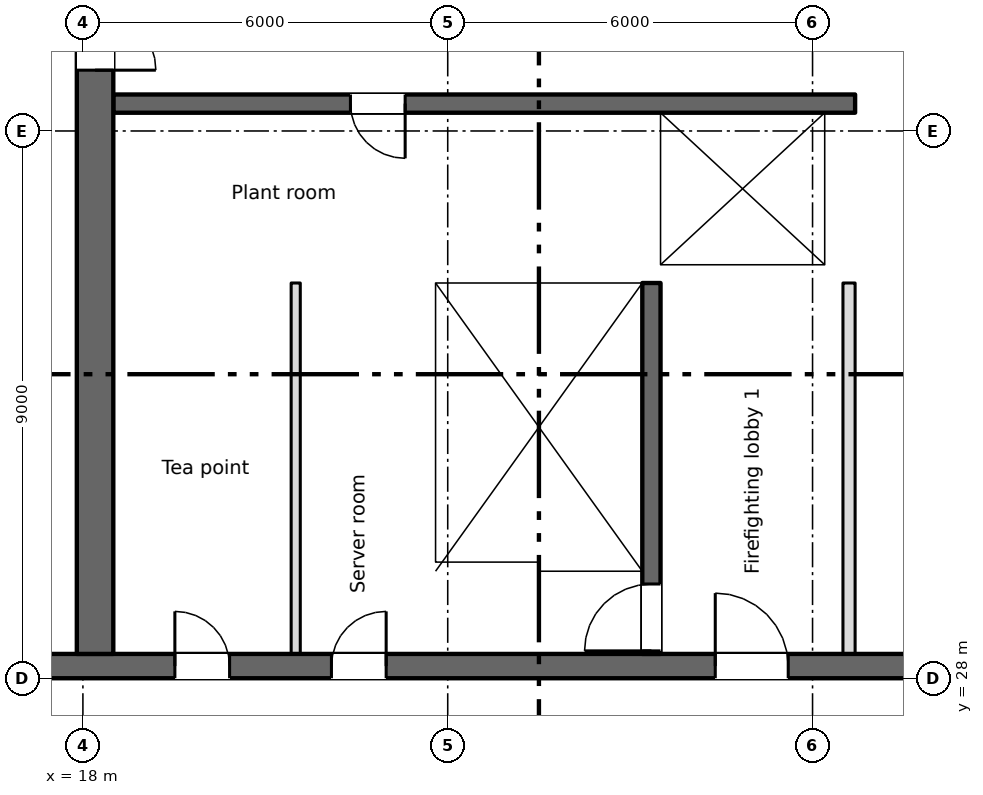
"""IFC4 building model, lengths in metres.
Left out: names, types, materials, properties, quantities, classifications, styles, units other than length and angle.
Written with IfcOpenShell. Run it as: python <this file> out.ifc"""

import sys

from ifc_helpers import new_model, si_unit, direction, frame, frame_2d, origin, place, context, subcontext, project, spatial, rectangle, extrude, element, fill, save


model = new_model("IFC4")
c1 = context("Model", 3, precision=1e-05, world=origin(), true_north=direction((0.0, 1.0)))
c2 = subcontext(c1, "Body", "Model", "MODEL_VIEW")
j1 = project(units=[si_unit("LENGTHUNIT", "METRE"), si_unit("PLANEANGLEUNIT", "RADIAN")], contexts=[c1])
p1 = place(None, origin())
s1 = spatial("IfcSite", under=j1, at=p1, CompositionType="ELEMENT")
p2 = place(p1, origin())
s2 = spatial("IfcBuilding", under=s1, at=p2, CompositionType="ELEMENT")
p3 = place(p2, frame((0.0, 0.0, 231.75)))
s3 = spatial("IfcBuildingStorey", under=s2, at=p3, CompositionType="ELEMENT", Elevation=231.75)
p4 = place(p3, frame((6.5, 28.2, 0.0), z_axis=(0.0, 0.0, 1.0), x_axis=(1.0, 0.0, 0.0)))
e1 = element("IfcWall", 1, at=p4, inside=s3, PredefinedType="SHEAR", context=c2, shape_type="SweptSolid", body=[
    extrude(rectangle(XDim=58.0, YDim=0.4, at=frame_2d((29.0, 0.0))), origin(), (0.0, 0.0, 1.0), 3.4),
])
p5 = place(p4, frame((13.012, 0.0, 0.0)))
e2 = element("IfcOpeningElement", 2, at=p5, cuts=e1, PredefinedType="OPENING", context=c2, shape_type="SweptSolid", body=[
    extrude(rectangle(XDim=0.9, YDim=2.1, at=frame_2d((0.45, 1.05))), frame((0.0, 0.21, 0.0), z_axis=(0.0, -1.0, 0.0), x_axis=(1.0, 0.0, 0.0)), (0.0, 0.0, 1.0), 0.42),
])
p6 = place(p4, frame((15.587, 0.0, 0.0)))
e3 = element("IfcOpeningElement", 3, at=p6, cuts=e1, PredefinedType="OPENING", context=c2, shape_type="SweptSolid", body=[
    extrude(rectangle(XDim=0.9, YDim=2.1, at=frame_2d((0.45, 1.05))), frame((0.0, 0.21, 0.0), z_axis=(0.0, -1.0, 0.0), x_axis=(1.0, 0.0, 0.0)), (0.0, 0.0, 1.0), 0.42),
])
p7 = place(p4, frame((48.512, 0.0, 0.0)))
e4 = element("IfcOpeningElement", 4, at=p7, cuts=e1, PredefinedType="OPENING", context=c2, shape_type="SweptSolid", body=[
    extrude(rectangle(XDim=0.9, YDim=2.1, at=frame_2d((0.45, 1.05))), frame((0.0, 0.21, 0.0), z_axis=(0.0, -1.0, 0.0), x_axis=(1.0, 0.0, 0.0)), (0.0, 0.0, 1.0), 0.42),
])
p8 = place(p4, frame((51.087, 0.0, 0.0)))
e5 = element("IfcOpeningElement", 5, at=p8, cuts=e1, PredefinedType="OPENING", context=c2, shape_type="SweptSolid", body=[
    extrude(rectangle(XDim=0.9, YDim=2.1, at=frame_2d((0.45, 1.05))), frame((0.0, 0.21, 0.0), z_axis=(0.0, -1.0, 0.0), x_axis=(1.0, 0.0, 0.0)), (0.0, 0.0, 1.0), 0.42),
])
p9 = place(p4, frame((0.762, 0.0, 0.0)))
e6 = element("IfcOpeningElement", 6, at=p9, cuts=e1, PredefinedType="OPENING", context=c2, shape_type="SweptSolid", body=[
    extrude(rectangle(XDim=0.9, YDim=2.1, at=frame_2d((0.45, 1.05))), frame((0.0, 0.21, 0.0), z_axis=(0.0, -1.0, 0.0), x_axis=(1.0, 0.0, 0.0)), (0.0, 0.0, 1.0), 0.42),
])
p10 = place(p4, frame((2.337, 0.0, 0.0)))
e7 = element("IfcOpeningElement", 7, at=p10, cuts=e1, PredefinedType="OPENING", context=c2, shape_type="SweptSolid", body=[
    extrude(rectangle(XDim=0.9, YDim=2.1, at=frame_2d((0.45, 1.05))), frame((0.0, 0.21, 0.0), z_axis=(0.0, -1.0, 0.0), x_axis=(1.0, 0.0, 0.0)), (0.0, 0.0, 1.0), 0.42),
])
p11 = place(p4, frame((4.9, 0.0, 0.0)))
e8 = element("IfcOpeningElement", 8, at=p11, cuts=e1, PredefinedType="OPENING", context=c2, shape_type="SweptSolid", body=[
    extrude(rectangle(XDim=1.2, YDim=2.1, at=frame_2d((0.6, 1.05))), frame((0.0, 0.21, 0.0), z_axis=(0.0, -1.0, 0.0), x_axis=(1.0, 0.0, 0.0)), (0.0, 0.0, 1.0), 0.42),
])
p12 = place(p4, frame((31.9, 0.0, 0.0)))
e9 = element("IfcOpeningElement", 9, at=p12, cuts=e1, PredefinedType="OPENING", context=c2, shape_type="SweptSolid", body=[
    extrude(rectangle(XDim=1.2, YDim=2.1, at=frame_2d((0.6, 1.05))), frame((0.0, 0.21, 0.0), z_axis=(0.0, -1.0, 0.0), x_axis=(1.0, 0.0, 0.0)), (0.0, 0.0, 1.0), 0.42),
])
p13 = place(p4, frame((55.4, 0.0, 0.0)))
e10 = element("IfcOpeningElement", 10, at=p13, cuts=e1, PredefinedType="OPENING", context=c2, shape_type="SweptSolid", body=[
    extrude(rectangle(XDim=1.2, YDim=2.1, at=frame_2d((0.6, 1.05))), frame((0.0, 0.21, 0.0), z_axis=(0.0, -1.0, 0.0), x_axis=(1.0, 0.0, 0.0)), (0.0, 0.0, 1.0), 0.42),
])
p14 = place(p4, frame((21.9, 0.0, 0.0)))
e11 = element("IfcOpeningElement", 11, at=p14, cuts=e1, PredefinedType="OPENING", context=c2, shape_type="SweptSolid", body=[
    extrude(rectangle(XDim=1.2, YDim=2.1, at=frame_2d((0.6, 1.05))), frame((0.0, 0.21, 0.0), z_axis=(0.0, -1.0, 0.0), x_axis=(1.0, 0.0, 0.0)), (0.0, 0.0, 1.0), 0.42),
])
p15 = place(p4, frame((41.9, 0.0, 0.0)))
e12 = element("IfcOpeningElement", 12, at=p15, cuts=e1, PredefinedType="OPENING", context=c2, shape_type="SweptSolid", body=[
    extrude(rectangle(XDim=1.2, YDim=2.1, at=frame_2d((0.6, 1.05))), frame((0.0, 0.21, 0.0), z_axis=(0.0, -1.0, 0.0), x_axis=(1.0, 0.0, 0.0)), (0.0, 0.0, 1.0), 0.42),
])
p16 = place(p4, frame((25.05, 0.0, 0.0)))
e13 = element("IfcOpeningElement", 13, at=p16, cuts=e1, PredefinedType="OPENING", context=c2, shape_type="SweptSolid", body=[
    extrude(rectangle(XDim=2.4, YDim=2.1, at=frame_2d((1.2, 1.05))), frame((0.0, 0.21, 0.0), z_axis=(0.0, -1.0, 0.0), x_axis=(1.0, 0.0, 0.0)), (0.0, 0.0, 1.0), 0.42),
])
p17 = place(p4, frame((37.55, 0.0, 0.0)))
e14 = element("IfcOpeningElement", 14, at=p17, cuts=e1, PredefinedType="OPENING", context=c2, shape_type="SweptSolid", body=[
    extrude(rectangle(XDim=2.4, YDim=2.1, at=frame_2d((1.2, 1.05))), frame((0.0, 0.21, 0.0), z_axis=(0.0, -1.0, 0.0), x_axis=(1.0, 0.0, 0.0)), (0.0, 0.0, 1.0), 0.42),
])
p18 = place(p4, frame((8.25, 0.0, 0.0)))
e15 = element("IfcOpeningElement", 15, at=p18, cuts=e1, PredefinedType="OPENING", context=c2, shape_type="SweptSolid", body=[
    extrude(rectangle(XDim=2.4, YDim=2.1, at=frame_2d((1.2, 1.05))), frame((0.0, 0.21, 0.0), z_axis=(0.0, -1.0, 0.0), x_axis=(1.0, 0.0, 0.0)), (0.0, 0.0, 1.0), 0.42),
])
p19 = place(p4, frame((29.05, 0.0, 0.0)))
e16 = element("IfcOpeningElement", 16, at=p19, cuts=e1, PredefinedType="OPENING", context=c2, shape_type="SweptSolid", body=[
    extrude(rectangle(XDim=0.9, YDim=2.1, at=frame_2d((0.45, 1.05))), frame((0.0, 0.21, 0.0), z_axis=(0.0, -1.0, 0.0), x_axis=(1.0, 0.0, 0.0)), (0.0, 0.0, 1.0), 0.42),
])
p20 = place(p4, frame((35.05, 0.0, 0.0)))
e17 = element("IfcOpeningElement", 17, at=p20, cuts=e1, PredefinedType="OPENING", context=c2, shape_type="SweptSolid", body=[
    extrude(rectangle(XDim=0.9, YDim=2.1, at=frame_2d((0.45, 1.05))), frame((0.0, 0.21, 0.0), z_axis=(0.0, -1.0, 0.0), x_axis=(1.0, 0.0, 0.0)), (0.0, 0.0, 1.0), 0.42),
])
p21 = place(p3, frame((18.2, 28.4, 0.0), z_axis=(0.0, 0.0, 1.0), x_axis=(0.0, 1.0, 0.0)))
e18 = element("IfcWall", 18, at=p21, inside=s3, PredefinedType="SHEAR", context=c2, shape_type="SweptSolid", body=[
    extrude(rectangle(XDim=17.0, YDim=0.6, at=frame_2d((8.5, 0.0))), origin(), (0.0, 0.0, 1.0), 3.4),
])
p22 = place(p21, frame((9.6, 0.0, 0.0)))
e19 = element("IfcOpeningElement", 19, at=p22, cuts=e18, PredefinedType="OPENING", context=c2, shape_type="SweptSolid", body=[
    extrude(rectangle(XDim=2.0, YDim=2.1, at=frame_2d((1.0, 1.05))), frame((0.0, 0.31, 0.0), z_axis=(0.0, -1.0, 0.0), x_axis=(1.0, 0.0, 0.0)), (0.0, 0.0, 1.0), 0.62),
])
p23 = place(p21, frame((15.45, 0.0, 0.0)))
e20 = element("IfcOpeningElement", 20, at=p23, cuts=e18, PredefinedType="OPENING", context=c2, shape_type="SweptSolid", body=[
    extrude(rectangle(XDim=1.2, YDim=2.1, at=frame_2d((0.6, 1.05))), frame((0.0, 0.31, 0.0), z_axis=(0.0, -1.0, 0.0), x_axis=(1.0, 0.0, 0.0)), (0.0, 0.0, 1.0), 0.62),
])
p24 = place(p3, frame((23.65, 28.4, 0.0), z_axis=(0.0, 0.0, 1.0), x_axis=(0.0, 1.0, 0.0)))
e21 = element("IfcWall", 21, at=p24, inside=s3, PredefinedType="SHEAR", context=c2, shape_type="SweptSolid", body=[
    extrude(rectangle(XDim=6.1, YDim=0.3, at=frame_2d((3.05, 0.0))), origin(), (0.0, 0.0, 1.0), 3.4),
])
p25 = place(p3, frame((27.35, 28.4, 0.0), z_axis=(0.0, 0.0, 1.0), x_axis=(0.0, 1.0, 0.0)))
e22 = element("IfcWall", 22, at=p25, inside=s3, PredefinedType="SHEAR", context=c2, shape_type="SweptSolid", body=[
    extrude(rectangle(XDim=6.1, YDim=0.3, at=frame_2d((3.05, 0.0))), origin(), (0.0, 0.0, 1.0), 3.4),
])
p26 = place(p25, frame((0.05, 0.0, 0.0)))
e23 = element("IfcOpeningElement", 23, at=p26, cuts=e22, PredefinedType="OPENING", context=c2, shape_type="SweptSolid", body=[
    extrude(rectangle(XDim=1.1, YDim=2.1, at=frame_2d((0.55, 1.05))), frame((0.0, 0.16, 0.0), z_axis=(0.0, -1.0, 0.0), x_axis=(1.0, 0.0, 0.0)), (0.0, 0.0, 1.0), 0.32),
])
p27 = place(p3, frame((18.5, 34.65, 0.0), z_axis=(0.0, 0.0, 1.0), x_axis=(1.0, 0.0, 0.0)))
e24 = element("IfcWall", 24, at=p27, inside=s3, PredefinedType="SHEAR", context=c2, shape_type="SweptSolid", body=[
    extrude(rectangle(XDim=12.2, YDim=0.3, at=frame_2d((6.1, 0.0))), origin(), (0.0, 0.0, 1.0), 3.4),
])
p28 = place(p27, frame((9.8, 0.0, 0.0)))
e25 = element("IfcOpeningElement", 25, at=p28, cuts=e24, PredefinedType="OPENING", context=c2, shape_type="SweptSolid", body=[
    extrude(rectangle(XDim=1.1, YDim=2.1, at=frame_2d((0.55, 1.05))), frame((0.0, 0.16, 0.0), z_axis=(0.0, -1.0, 0.0), x_axis=(1.0, 0.0, 0.0)), (0.0, 0.0, 1.0), 0.32),
])
p29 = place(p3, frame((30.7, 37.45, 0.0), z_axis=(0.0, 0.0, 1.0), x_axis=(-1.0, 0.0, 0.0)))
e26 = element("IfcWall", 26, at=p29, inside=s3, PredefinedType="SHEAR", context=c2, shape_type="SweptSolid", body=[
    extrude(rectangle(XDim=12.2, YDim=0.3, at=frame_2d((6.1, 0.0))), origin(), (0.0, 0.0, 1.0), 3.4),
])
p30 = place(p29, frame((7.4, 0.0, 0.0)))
e27 = element("IfcOpeningElement", 27, at=p30, cuts=e26, PredefinedType="OPENING", context=c2, shape_type="SweptSolid", body=[
    extrude(rectangle(XDim=0.9, YDim=2.1, at=frame_2d((0.45, 1.05))), frame((0.0, 0.16, 0.0), z_axis=(0.0, -1.0, 0.0), x_axis=(1.0, 0.0, 0.0)), (0.0, 0.0, 1.0), 0.32),
])
p31 = place(p3, frame((27.35, 34.8, 0.0), z_axis=(0.0, 0.0, 1.0), x_axis=(0.0, 1.0, 0.0)))
e28 = element("IfcWall", 28, at=p31, inside=s3, PredefinedType="SHEAR", context=c2, shape_type="SweptSolid", body=[
    extrude(rectangle(XDim=2.5, YDim=0.3, at=frame_2d((1.25, 0.0))), origin(), (0.0, 0.0, 1.0), 3.4),
])
p32 = place(p3, frame((30.45, 34.8, 0.0), z_axis=(0.0, 0.0, 1.0), x_axis=(0.0, 1.0, 0.0)))
e29 = element("IfcWall", 29, at=p32, inside=s3, PredefinedType="SHEAR", context=c2, shape_type="SweptSolid", body=[
    extrude(rectangle(XDim=2.5, YDim=0.5, at=frame_2d((1.25, 0.0))), origin(), (0.0, 0.0, 1.0), 3.4),
])
p33 = place(p3, frame((30.6, 28.4, 0.0), z_axis=(0.0, 0.0, 1.0), x_axis=(0.0, 1.0, 0.0)))
e30 = element("IfcWall", 30, at=p33, inside=s3, PredefinedType="PARTITIONING", context=c2, shape_type="SweptSolid", body=[
    extrude(rectangle(XDim=6.1, YDim=0.2, at=frame_2d((3.05, 0.0))), origin(), (0.0, 0.0, 1.0), 3.4),
])
p34 = place(p3, frame((21.5, 28.4, 0.0), z_axis=(0.0, 0.0, 1.0), x_axis=(0.0, 1.0, 0.0)))
e31 = element("IfcWall", 31, at=p34, inside=s3, PredefinedType="PARTITIONING", context=c2, shape_type="SweptSolid", body=[
    extrude(rectangle(XDim=6.1, YDim=0.15, at=frame_2d((3.05, 0.0))), origin(), (0.0, 0.0, 1.0), 3.4),
])
p35 = place(p5, origin())
e32 = element("IfcDoor", 32, at=p35, inside=s3, OperationType="SINGLE_SWING_LEFT", PredefinedType="DOOR", context=c2, shape_type="SweptSolid", body=[
    extrude(rectangle(XDim=0.9, YDim=2.1, at=frame_2d((0.45, 1.05))), frame((0.0, 0.025, 0.0), z_axis=(0.0, -1.0, 0.0), x_axis=(1.0, 0.0, 0.0)), (0.0, 0.0, 1.0), 0.05),
])
fill(e2, e32)
p36 = place(p6, origin())
e33 = element("IfcDoor", 33, at=p36, inside=s3, OperationType="SINGLE_SWING_RIGHT", PredefinedType="DOOR", context=c2, shape_type="SweptSolid", body=[
    extrude(rectangle(XDim=0.9, YDim=2.1, at=frame_2d((0.45, 1.05))), frame((0.0, 0.025, 0.0), z_axis=(0.0, -1.0, 0.0), x_axis=(1.0, 0.0, 0.0)), (0.0, 0.0, 1.0), 0.05),
])
fill(e3, e33)
p37 = place(p30, origin())
e34 = element("IfcDoor", 34, at=p37, inside=s3, OperationType="SINGLE_SWING_LEFT", PredefinedType="DOOR", context=c2, shape_type="SweptSolid", body=[
    extrude(rectangle(XDim=0.9, YDim=2.1, at=frame_2d((0.45, 1.05))), frame((0.0, 0.025, 0.0), z_axis=(0.0, -1.0, 0.0), x_axis=(1.0, 0.0, 0.0)), (0.0, 0.0, 1.0), 0.05),
])
fill(e27, e34)
p38 = place(p28, origin())
e35 = element("IfcDoor", 35, at=p38, inside=s3, OperationType="SLIDING_TO_LEFT", PredefinedType="DOOR", context=c2, shape_type="SweptSolid", body=[
    extrude(rectangle(XDim=1.1, YDim=2.1, at=frame_2d((0.55, 1.05))), frame((0.0, 0.025, 0.0), z_axis=(0.0, -1.0, 0.0), x_axis=(1.0, 0.0, 0.0)), (0.0, 0.0, 1.0), 0.05),
])
fill(e25, e35)
p39 = place(p26, origin())
e36 = element("IfcDoor", 36, at=p39, inside=s3, OperationType="SINGLE_SWING_LEFT", PredefinedType="DOOR", context=c2, shape_type="SweptSolid", body=[
    extrude(rectangle(XDim=1.1, YDim=2.1, at=frame_2d((0.55, 1.05))), frame((0.0, 0.025, 0.0), z_axis=(0.0, -1.0, 0.0), x_axis=(1.0, 0.0, 0.0)), (0.0, 0.0, 1.0), 0.05),
])
fill(e23, e36)
p40 = place(p14, origin())
e37 = element("IfcDoor", 37, at=p40, inside=s3, OperationType="SINGLE_SWING_LEFT", PredefinedType="DOOR", context=c2, shape_type="SweptSolid", body=[
    extrude(rectangle(XDim=1.2, YDim=2.1, at=frame_2d((0.6, 1.05))), frame((0.0, 0.025, 0.0), z_axis=(0.0, -1.0, 0.0), x_axis=(1.0, 0.0, 0.0)), (0.0, 0.0, 1.0), 0.05),
])
fill(e11, e37)
p41 = place(p22, origin())
e38 = element("IfcDoor", 38, at=p41, inside=s3, OperationType="DOUBLE_DOOR_SINGLE_SWING", PredefinedType="DOOR", context=c2, shape_type="SweptSolid", body=[
    extrude(rectangle(XDim=2.0, YDim=2.1, at=frame_2d((1.0, 1.05))), frame((0.0, 0.025, 0.0), z_axis=(0.0, -1.0, 0.0), x_axis=(1.0, 0.0, 0.0)), (0.0, 0.0, 1.0), 0.05),
])
fill(e19, e38)
save(model, sys.argv[1])
